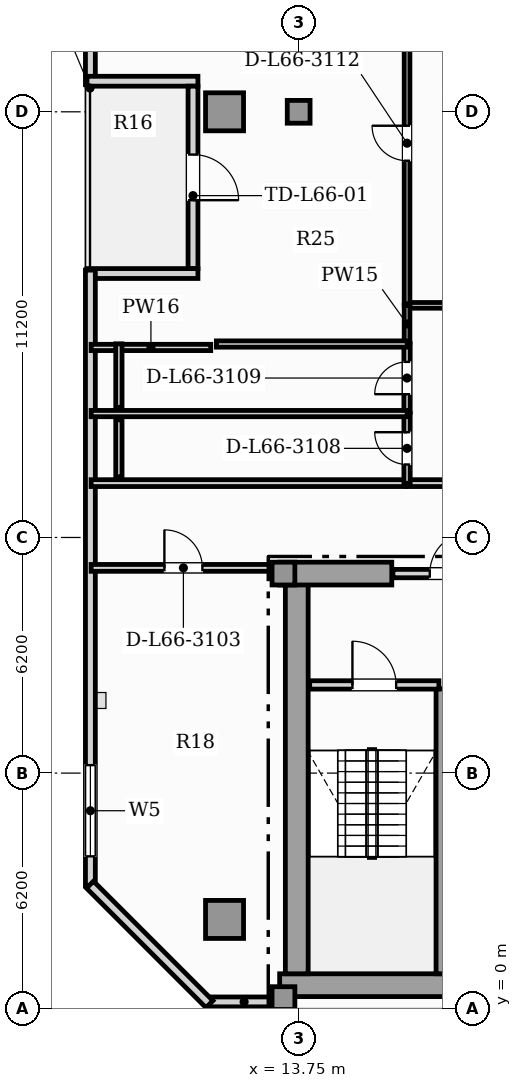
"""IFC4 building model, lengths in metres.
Left out: names, types, materials, properties, quantities, classifications, styles, units other than length and angle.
Written with IfcOpenShell. Run it as: python <this file> out.ifc"""

import sys

from ifc_helpers import new_model, si_unit, direction, frame, frame_2d, origin, origin_2d, place, context, subcontext, project, spatial, rectangle, hollow_rectangle, extrude, element, fill, save


model = new_model("IFC4")
c1 = context("Model", 3, precision=1e-05, world=origin(), true_north=direction((0.0, 1.0)))
c2 = subcontext(c1, "Body", "Model", "MODEL_VIEW")
j1 = project(units=[si_unit("LENGTHUNIT", "METRE"), si_unit("PLANEANGLEUNIT", "RADIAN")], contexts=[c1])
p1 = place(None, origin())
s1 = spatial("IfcSite", under=j1, at=p1, CompositionType="ELEMENT")
p2 = place(p1, origin())
s2 = spatial("IfcBuilding", under=s1, at=p2, CompositionType="ELEMENT")
p3 = place(p2, frame((0.0, 0.0, 268.3)))
s3 = spatial("IfcBuildingStorey", under=s2, at=p3, CompositionType="ELEMENT", Elevation=268.3)
p4 = place(p3, frame((13.25, 0.62, 0.0), z_axis=(0.0, 0.0, 1.0), x_axis=(1.0, 0.0, 0.0)))
e1 = element("IfcWall", 1, at=p4, inside=s3, PredefinedType="SHEAR", context=c2, shape_type="SweptSolid", body=[
    extrude(rectangle(XDim=31.0, YDim=0.6, at=frame_2d((15.5, 0.0))), origin(), (0.0, 0.0, 1.0), 3.65),
])
p5 = place(p3, frame((13.7, 0.92, 0.0), z_axis=(0.0, 0.0, 1.0), x_axis=(0.0, 1.0, 0.0)))
e2 = element("IfcWall", 2, at=p5, inside=s3, PredefinedType="SHEAR", context=c2, shape_type="SweptSolid", body=[
    extrude(rectangle(XDim=10.53, YDim=0.6, at=frame_2d((5.265, 0.0))), origin(), (0.0, 0.0, 1.0), 3.65),
])
p6 = place(p3, frame((13.25, 11.45, 0.0), z_axis=(0.0, 0.0, 1.0), x_axis=(1.0, 0.0, 0.0)))
e3 = element("IfcWall", 3, at=p6, inside=s3, PredefinedType="SHEAR", context=c2, shape_type="SweptSolid", body=[
    extrude(rectangle(XDim=2.95, YDim=0.6, at=frame_2d((1.475, 0.0))), origin(), (0.0, 0.0, 1.0), 3.65),
])
p7 = place(p3, frame((17.54, 0.92, 0.0), z_axis=(0.0, 0.0, 1.0), x_axis=(0.0, 1.0, 0.0)))
e4 = element("IfcWall", 4, at=p7, inside=s3, PredefinedType="SHEAR", context=c2, shape_type="SweptSolid", body=[
    extrude(rectangle(XDim=7.5, YDim=0.35, at=frame_2d((3.75, 0.0))), origin(), (0.0, 0.0, 1.0), 3.65),
])
for number, where, z_axis, x_axis in (
    (5, (13.35, 0.28, 0.0), (0.0, 0.0, 1.0), (1.0, 0.0, 0.0)),
    (6, (13.35, 11.45, 0.0), (0.0, 0.0, 1.0), (1.0, 0.0, 0.0)),
):
    element("IfcColumn", number, at=place(p3, frame(where, z_axis=z_axis, x_axis=x_axis)), inside=s3, PredefinedType="COLUMN", context=c2, shape_type="SweptSolid", body=[
        extrude(rectangle(XDim=0.6, YDim=0.6, at=origin_2d()), origin(), (0.0, 0.0, 1.0), 3.85),
    ])
for number, where, z_axis, x_axis in (
    (7, (11.8, 2.35, 0.0), (0.0, 0.0, 1.0), (1.0, 0.0, 0.0)),
    (8, (11.8, 23.6, 0.0), (0.0, 0.0, 1.0), (1.0, 0.0, 0.0)),
):
    element("IfcColumn", number, at=place(p3, frame(where, z_axis=z_axis, x_axis=x_axis)), inside=s3, PredefinedType="USERDEFINED", context=c2, shape_type="SweptSolid", body=[
        extrude(hollow_rectangle(XDim=1.0, YDim=1.0, WallThickness=0.06, at=origin_2d()), origin(), (0.0, 0.0, 1.0), 3.85),
    ])
p8 = place(p3, frame((13.75, 23.6, 0.0), z_axis=(0.0, 0.0, 1.0), x_axis=(1.0, 0.0, 0.0)))
e9 = element("IfcColumn", 9, at=p8, inside=s3, PredefinedType="COLUMN", context=c2, shape_type="SweptSolid", body=[
    extrude(rectangle(XDim=0.6, YDim=0.6, at=origin_2d()), origin(), (0.0, 0.0, 1.0), 3.85),
])
p9 = place(p3, frame((11.38, 0.18, 0.0), z_axis=(0.0, 0.0, 1.0), x_axis=(1.0, 0.0, 0.0)))
e10 = element("IfcWall", 10, at=p9, inside=s3, PredefinedType="SOLIDWALL", context=c2, shape_type="SweptSolid", body=[
    extrude(rectangle(XDim=1.87, YDim=0.26, at=frame_2d((0.935, 0.0))), origin(), (0.0, 0.0, 1.0), 3.65),
])
p10 = place(p3, frame((8.27, 32.109, 0.0), z_axis=(0.0, 0.0, 1.0), x_axis=(0.0, -1.0, 0.0)))
e11 = element("IfcWall", 11, at=p10, inside=s3, PredefinedType="SOLIDWALL", context=c2, shape_type="SweptSolid", body=[
    extrude(rectangle(XDim=7.795, YDim=0.26, at=frame_2d((3.897, 0.0))), origin(), (0.0, 0.0, 1.0), 3.65),
])
p11 = place(p10, frame((3.909, 0.0, 0.95)))
e12 = element("IfcOpeningElement", 12, at=p11, cuts=e11, PredefinedType="OPENING", context=c2, shape_type="SweptSolid", body=[
    extrude(rectangle(XDim=0.9, YDim=1.5, at=frame_2d((0.45, 0.75))), frame((0.0, 0.14, 0.0), z_axis=(0.0, -1.0, 0.0), x_axis=(1.0, 0.0, 0.0)), (0.0, 0.0, 1.0), 0.28),
])
p12 = place(p3, frame((8.18, 24.405, 0.0), z_axis=(0.0, 0.0, 1.0), x_axis=(1.0, 0.0, 0.0)))
e13 = element("IfcWall", 13, at=p12, inside=s3, PredefinedType="SOLIDWALL", context=c2, shape_type="SweptSolid", body=[
    extrude(rectangle(XDim=2.92, YDim=0.26, at=frame_2d((1.46, 0.0))), origin(), (0.0, 0.0, 1.0), 3.65),
])
p13 = place(p3, frame((10.97, 24.275, 0.0), z_axis=(0.0, 0.0, 1.0), x_axis=(0.0, -1.0, 0.0)))
e14 = element("IfcWall", 14, at=p13, inside=s3, PredefinedType="SOLIDWALL", context=c2, shape_type="SweptSolid", body=[
    extrude(rectangle(XDim=4.8, YDim=0.26, at=frame_2d((2.4, 0.0))), origin(), (0.0, 0.0, 1.0), 3.19),
])
p14 = place(p13, frame((1.8, 0.0, 0.0)))
e15 = element("IfcOpeningElement", 15, at=p14, cuts=e14, PredefinedType="OPENING", context=c2, shape_type="SweptSolid", body=[
    extrude(rectangle(XDim=1.2, YDim=2.2, at=frame_2d((0.6, 1.1))), frame((0.0, 0.14, 0.0), z_axis=(0.0, -1.0, 0.0), x_axis=(1.0, 0.0, 0.0)), (0.0, 0.0, 1.0), 0.28),
])
p15 = place(p3, frame((11.1, 19.345, 0.0), z_axis=(0.0, 0.0, 1.0), x_axis=(-1.0, 0.0, 0.0)))
e16 = element("IfcWall", 16, at=p15, inside=s3, PredefinedType="SOLIDWALL", context=c2, shape_type="SweptSolid", body=[
    extrude(rectangle(XDim=2.92, YDim=0.26, at=frame_2d((1.46, 0.0))), origin(), (0.0, 0.0, 1.0), 3.65),
])
p16 = place(p3, frame((8.27, 19.435, 0.0), z_axis=(0.0, 0.0, 1.0), x_axis=(0.0, -1.0, 0.0)))
e17 = element("IfcWall", 17, at=p16, inside=s3, PredefinedType="SOLIDWALL", context=c2, shape_type="SweptSolid", body=[
    extrude(rectangle(XDim=16.195, YDim=0.26, at=frame_2d((8.097, 0.0))), origin(), (0.0, 0.0, 1.0), 3.65),
])
p17 = place(p16, frame((13.025, 0.0, 0.85)))
e18 = element("IfcOpeningElement", 18, at=p17, cuts=e17, PredefinedType="OPENING", context=c2, shape_type="SweptSolid", body=[
    extrude(rectangle(XDim=2.4, YDim=2.0, at=frame_2d((1.2, 1.0))), frame((0.0, 0.14, 0.0), z_axis=(0.0, -1.0, 0.0), x_axis=(1.0, 0.0, 0.0)), (0.0, 0.0, 1.0), 0.28),
])
p18 = place(p3, frame((8.26, 3.264, 0.0), z_axis=(0.0, 0.0, 1.0), x_axis=(0.707079321262, -0.707134240044, 0.0)))
e19 = element("IfcWall", 19, at=p18, inside=s3, PredefinedType="SOLIDWALL", context=c2, shape_type="SweptSolid", body=[
    extrude(rectangle(XDim=4.446, YDim=0.26, at=frame_2d((2.223, 0.0))), origin(), (0.0, 0.0, 1.0), 3.65),
])
p19 = place(p3, frame((14.04, 8.52, 0.0), z_axis=(0.0, 0.0, 1.0), x_axis=(1.0, 0.0, 0.0)))
e20 = element("IfcWall", 20, at=p19, inside=s3, PredefinedType="SOLIDWALL", context=c2, shape_type="SweptSolid", body=[
    extrude(rectangle(XDim=3.4, YDim=0.22, at=frame_2d((1.7, 0.0))), origin(), (0.0, 0.0, 1.0), 3.65),
])
p20 = place(p19, frame((1.125, 0.0, 0.0)))
e21 = element("IfcOpeningElement", 21, at=p20, cuts=e20, PredefinedType="OPENING", context=c2, shape_type="SweptSolid", body=[
    extrude(rectangle(XDim=1.15, YDim=2.2, at=frame_2d((0.575, 1.1))), frame((0.0, 0.12, 0.0), z_axis=(0.0, -1.0, 0.0), x_axis=(1.0, 0.0, 0.0)), (0.0, 0.0, 1.0), 0.24),
])
p21 = place(p3, frame((16.23, 11.45, 0.0), z_axis=(0.0, 0.0, 1.0), x_axis=(1.0, 0.0, 0.0)))
e22 = element("IfcWall", 22, at=p21, inside=s3, PredefinedType="SOLIDWALL", context=c2, shape_type="SweptSolid", body=[
    extrude(rectangle(XDim=3.04, YDim=0.22, at=frame_2d((1.52, 0.0))), origin(), (0.0, 0.0, 1.0), 3.65),
])
p22 = place(p21, frame((0.97, 0.0, 0.0)))
e23 = element("IfcOpeningElement", 23, at=p22, cuts=e22, PredefinedType="OPENING", context=c2, shape_type="SweptSolid", body=[
    extrude(rectangle(XDim=1.1, YDim=2.2, at=frame_2d((0.55, 1.1))), frame((0.0, 0.12, 0.0), z_axis=(0.0, -1.0, 0.0), x_axis=(1.0, 0.0, 0.0)), (0.0, 0.0, 1.0), 0.24),
])
p23 = place(p3, frame((8.289, 11.6, 0.0), z_axis=(0.0, 0.0, 1.0), x_axis=(1.0, 0.0, 0.0)))
e24 = element("IfcWall", 24, at=p23, inside=s3, PredefinedType="PARTITIONING", context=c2, shape_type="SweptSolid", body=[
    extrude(rectangle(XDim=4.856, YDim=0.18, at=frame_2d((2.428, 0.0))), origin(), (0.0, 0.0, 1.0), 3.65),
])
p24 = place(p23, frame((1.928, 0.0, 0.0)))
e25 = element("IfcOpeningElement", 25, at=p24, cuts=e24, PredefinedType="OPENING", context=c2, shape_type="SweptSolid", body=[
    extrude(rectangle(XDim=1.0, YDim=2.15, at=frame_2d((0.5, 1.075))), frame((0.0, 0.1, 0.0), z_axis=(0.0, -1.0, 0.0), x_axis=(1.0, 0.0, 0.0)), (0.0, 0.0, 1.0), 0.2),
])
p25 = place(p3, frame((16.597, 13.83, 0.0), z_axis=(0.0, 0.0, 1.0), x_axis=(1.0, 0.0, 0.0)))
e26 = element("IfcWall", 26, at=p25, inside=s3, PredefinedType="PARTITIONING", context=c2, shape_type="SweptSolid", body=[
    extrude(rectangle(XDim=4.99, YDim=0.18, at=frame_2d((2.495, 0.0))), origin(), (0.0, 0.0, 1.0), 3.65),
])
p26 = place(p25, frame((1.995, 0.0, 0.0)))
e27 = element("IfcOpeningElement", 27, at=p26, cuts=e26, PredefinedType="OPENING", context=c2, shape_type="SweptSolid", body=[
    extrude(rectangle(XDim=1.0, YDim=2.15, at=frame_2d((0.5, 1.075))), frame((0.0, 0.1, 0.0), z_axis=(0.0, -1.0, 0.0), x_axis=(1.0, 0.0, 0.0)), (0.0, 0.0, 1.0), 0.2),
])
p27 = place(p3, frame((8.289, 13.83, 0.0), z_axis=(0.0, 0.0, 1.0), x_axis=(1.0, 0.0, 0.0)))
e28 = element("IfcWall", 28, at=p27, inside=s3, PredefinedType="PARTITIONING", context=c2, shape_type="SweptSolid", body=[
    extrude(rectangle(XDim=8.278, YDim=0.18, at=frame_2d((4.139, 0.0))), origin(), (0.0, 0.0, 1.0), 3.65),
])
p28 = place(p3, frame((16.597, 18.507, 0.0), z_axis=(0.0, 0.0, 1.0), x_axis=(1.0, 0.0, 0.0)))
e29 = element("IfcWall", 29, at=p28, inside=s3, PredefinedType="PARTITIONING", context=c2, shape_type="SweptSolid", body=[
    extrude(rectangle(XDim=4.99, YDim=0.15, at=frame_2d((2.495, 0.0))), origin(), (0.0, 0.0, 1.0), 3.65),
])
p29 = place(p28, frame((2.035, 0.0, 0.0)))
e30 = element("IfcOpeningElement", 30, at=p29, cuts=e29, PredefinedType="OPENING", context=c2, shape_type="SweptSolid", body=[
    extrude(rectangle(XDim=0.92, YDim=2.1, at=frame_2d((0.46, 1.05))), frame((0.0, 0.085, 0.0), z_axis=(0.0, -1.0, 0.0), x_axis=(1.0, 0.0, 0.0)), (0.0, 0.0, 1.0), 0.17),
])
p30 = place(p3, frame((16.602, 13.825, 0.0), z_axis=(0.0, 0.0, 1.0), x_axis=(0.0, 1.0, 0.0)))
e31 = element("IfcWall", 31, at=p30, inside=s3, PredefinedType="PLUMBINGWALL", context=c2, shape_type="SweptSolid", body=[
    extrude(rectangle(XDim=1.84, YDim=0.165, at=frame_2d((0.92, 0.0))), origin(), (0.0, 0.0, 1.0), 3.65),
])
p31 = place(p30, frame((0.495, 0.0, 0.0)))
e32 = element("IfcOpeningElement", 32, at=p31, cuts=e31, PredefinedType="OPENING", context=c2, shape_type="SweptSolid", body=[
    extrude(rectangle(XDim=0.85, YDim=2.1, at=frame_2d((0.425, 1.05))), frame((0.0, 0.093, 0.0), z_axis=(0.0, -1.0, 0.0), x_axis=(1.0, 0.0, 0.0)), (0.0, 0.0, 1.0), 0.185),
])
p32 = place(p3, frame((16.602, 15.695, 0.0), z_axis=(0.0, 0.0, 1.0), x_axis=(0.0, 1.0, 0.0)))
e33 = element("IfcWall", 33, at=p32, inside=s3, PredefinedType="PLUMBINGWALL", context=c2, shape_type="SweptSolid", body=[
    extrude(rectangle(XDim=1.8, YDim=0.165, at=frame_2d((0.9, 0.0))), origin(), (0.0, 0.0, 1.0), 3.65),
])
p33 = place(p32, frame((0.475, 0.0, 0.0)))
e34 = element("IfcOpeningElement", 34, at=p33, cuts=e33, PredefinedType="OPENING", context=c2, shape_type="SweptSolid", body=[
    extrude(rectangle(XDim=0.85, YDim=2.1, at=frame_2d((0.425, 1.05))), frame((0.0, 0.093, 0.0), z_axis=(0.0, -1.0, 0.0), x_axis=(1.0, 0.0, 0.0)), (0.0, 0.0, 1.0), 0.185),
])
p34 = place(p3, frame((16.602, 17.525, 0.0), z_axis=(0.0, 0.0, 1.0), x_axis=(0.0, 1.0, 0.0)))
e35 = element("IfcWall", 35, at=p34, inside=s3, PredefinedType="PARTITIONING", context=c2, shape_type="SweptSolid", body=[
    extrude(rectangle(XDim=0.987, YDim=0.15, at=frame_2d((0.494, 0.0))), origin(), (0.0, 0.0, 1.0), 3.65),
])
p35 = place(p3, frame((16.602, 18.542, 0.0), z_axis=(0.0, 0.0, 1.0), x_axis=(0.0, 1.0, 0.0)))
e36 = element("IfcWall", 36, at=p35, inside=s3, PredefinedType="PARTITIONING", context=c2, shape_type="SweptSolid", body=[
    extrude(rectangle(XDim=8.463, YDim=0.15, at=frame_2d((4.231, 0.0))), origin(), (0.0, 0.0, 1.0), 3.65),
])
p36 = place(p35, frame((3.771, 0.0, 0.0)))
e37 = element("IfcOpeningElement", 37, at=p36, cuts=e36, PredefinedType="OPENING", context=c2, shape_type="SweptSolid", body=[
    extrude(rectangle(XDim=0.92, YDim=2.1, at=frame_2d((0.46, 1.05))), frame((0.0, 0.085, 0.0), z_axis=(0.0, -1.0, 0.0), x_axis=(1.0, 0.0, 0.0)), (0.0, 0.0, 1.0), 0.17),
])
p37 = place(p3, frame((8.289, 15.66, 0.0), z_axis=(0.0, 0.0, 1.0), x_axis=(1.0, 0.0, 0.0)))
e38 = element("IfcWall", 38, at=p37, inside=s3, PredefinedType="PLUMBINGWALL", context=c2, shape_type="SweptSolid", body=[
    extrude(rectangle(XDim=8.318, YDim=0.165, at=frame_2d((4.159, 0.0))), origin(), (0.0, 0.0, 1.0), 3.65),
])
p38 = place(p3, frame((11.585, 17.49, 0.0), z_axis=(0.0, 0.0, 1.0), x_axis=(1.0, 0.0, 0.0)))
e39 = element("IfcWall", 39, at=p38, inside=s3, PredefinedType="PLUMBINGWALL", context=c2, shape_type="SweptSolid", body=[
    extrude(rectangle(XDim=5.022, YDim=0.165, at=frame_2d((2.511, 0.0))), origin(), (0.0, 0.0, 1.0), 3.65),
])
p39 = place(p3, frame((9.02, 13.995, 0.0), z_axis=(0.0, 0.0, 1.0), x_axis=(0.0, 1.0, 0.0)))
e40 = element("IfcWall", 40, at=p39, inside=s3, PredefinedType="PLUMBINGWALL", context=c2, shape_type="SweptSolid", body=[
    extrude(rectangle(XDim=1.5, YDim=0.165, at=frame_2d((0.75, 0.0))), origin(), (0.0, 0.0, 1.0), 3.65),
])
p40 = place(p3, frame((8.289, 17.4, 0.0), z_axis=(0.0, 0.0, 1.0), x_axis=(1.0, 0.0, 0.0)))
e41 = element("IfcWall", 41, at=p40, inside=s3, PredefinedType="PLUMBINGWALL", context=c2, shape_type="SweptSolid", body=[
    extrude(rectangle(XDim=3.147, YDim=0.165, at=frame_2d((1.573, 0.0))), origin(), (0.0, 0.0, 1.0), 3.65),
])
p41 = place(p3, frame((9.02, 15.825, 0.0), z_axis=(0.0, 0.0, 1.0), x_axis=(0.0, 1.0, 0.0)))
e42 = element("IfcWall", 42, at=p41, inside=s3, PredefinedType="PLUMBINGWALL", context=c2, shape_type="SweptSolid", body=[
    extrude(rectangle(XDim=1.67, YDim=0.165, at=frame_2d((0.835, 0.0))), origin(), (0.0, 0.0, 1.0), 3.65),
])
p42 = place(p14, frame((1.2, 0.0, 0.0), z_axis=(0.0, 0.0, 1.0), x_axis=(-1.0, 0.0, 0.0)))
e43 = element("IfcDoor", 43, at=p42, inside=s3, OperationType="SINGLE_SWING_LEFT", PredefinedType="DOOR", context=c2, shape_type="SweptSolid", body=[
    extrude(rectangle(XDim=1.2, YDim=2.2, at=frame_2d((0.6, 1.1))), frame((0.0, 0.025, 0.0), z_axis=(0.0, -1.0, 0.0), x_axis=(1.0, 0.0, 0.0)), (0.0, 0.0, 1.0), 0.05),
])
fill(e15, e43)
p43 = place(p17, origin())
e44 = element("IfcWindow", 44, at=p43, inside=s3, PartitioningType="SINGLE_PANEL", PredefinedType="WINDOW", context=c2, shape_type="SweptSolid", body=[
    extrude(rectangle(XDim=2.4, YDim=2.0, at=frame_2d((1.2, 1.0))), frame((0.0, 0.03, 0.0), z_axis=(0.0, -1.0, 0.0), x_axis=(1.0, 0.0, 0.0)), (0.0, 0.0, 1.0), 0.06),
])
fill(e18, e44)
p44 = place(p20, origin())
e45 = element("IfcDoor", 45, at=p44, inside=s3, OperationType="SINGLE_SWING_LEFT", PredefinedType="DOOR", context=c2, shape_type="SweptSolid", body=[
    extrude(rectangle(XDim=1.15, YDim=2.2, at=frame_2d((0.575, 1.1))), frame((0.0, 0.025, 0.0), z_axis=(0.0, -1.0, 0.0), x_axis=(1.0, 0.0, 0.0)), (0.0, 0.0, 1.0), 0.05),
])
fill(e21, e45)
p45 = place(p22, origin())
e46 = element("IfcDoor", 46, at=p45, inside=s3, OperationType="SINGLE_SWING_RIGHT", PredefinedType="DOOR", context=c2, shape_type="SweptSolid", body=[
    extrude(rectangle(XDim=1.1, YDim=2.2, at=frame_2d((0.55, 1.1))), frame((0.0, 0.025, 0.0), z_axis=(0.0, -1.0, 0.0), x_axis=(1.0, 0.0, 0.0)), (0.0, 0.0, 1.0), 0.05),
])
fill(e23, e46)
p46 = place(p24, origin())
e47 = element("IfcDoor", 47, at=p46, inside=s3, OperationType="SINGLE_SWING_LEFT", PredefinedType="DOOR", context=c2, shape_type="SweptSolid", body=[
    extrude(rectangle(XDim=1.0, YDim=2.15, at=frame_2d((0.5, 1.075))), frame((0.0, 0.025, 0.0), z_axis=(0.0, -1.0, 0.0), x_axis=(1.0, 0.0, 0.0)), (0.0, 0.0, 1.0), 0.05),
])
fill(e25, e47)
p47 = place(p31, origin())
e48 = element("IfcDoor", 48, at=p47, inside=s3, OperationType="SINGLE_SWING_RIGHT", PredefinedType="DOOR", context=c2, shape_type="SweptSolid", body=[
    extrude(rectangle(XDim=0.85, YDim=2.1, at=frame_2d((0.425, 1.05))), frame((0.0, 0.025, 0.0), z_axis=(0.0, -1.0, 0.0), x_axis=(1.0, 0.0, 0.0)), (0.0, 0.0, 1.0), 0.05),
])
fill(e32, e48)
p48 = place(p33, origin())
e49 = element("IfcDoor", 49, at=p48, inside=s3, OperationType="SINGLE_SWING_LEFT", PredefinedType="DOOR", context=c2, shape_type="SweptSolid", body=[
    extrude(rectangle(XDim=0.85, YDim=2.1, at=frame_2d((0.425, 1.05))), frame((0.0, 0.025, 0.0), z_axis=(0.0, -1.0, 0.0), x_axis=(1.0, 0.0, 0.0)), (0.0, 0.0, 1.0), 0.05),
])
fill(e34, e49)
p49 = place(p36, origin())
e50 = element("IfcDoor", 50, at=p49, inside=s3, OperationType="SINGLE_SWING_RIGHT", PredefinedType="DOOR", context=c2, shape_type="SweptSolid", body=[
    extrude(rectangle(XDim=0.92, YDim=2.1, at=frame_2d((0.46, 1.05))), frame((0.0, 0.025, 0.0), z_axis=(0.0, -1.0, 0.0), x_axis=(1.0, 0.0, 0.0)), (0.0, 0.0, 1.0), 0.05),
])
fill(e37, e50)
save(model, sys.argv[1])
